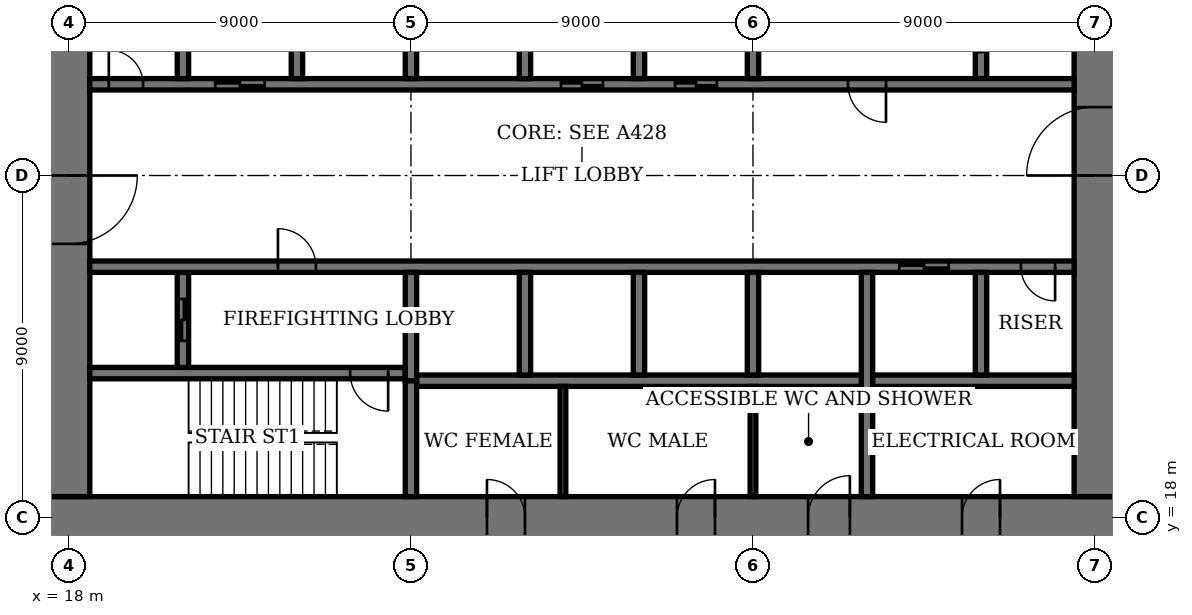
"""IFC4 building model, lengths in metres.
Left out: names, types, materials, properties, quantities, classifications, styles, units other than length and angle.
Written with IfcOpenShell. Run it as: python <this file> out.ifc"""

import sys

from ifc_helpers import new_model, si_unit, direction, frame, frame_2d, origin, place, context, subcontext, project, spatial, rectangle, extrude, element, fill, save


model = new_model("IFC4")
c1 = context("Model", 3, precision=1e-05, world=origin(), true_north=direction((0.0, 1.0)))
c2 = subcontext(c1, "Body", "Model", "MODEL_VIEW")
j1 = project(units=[si_unit("LENGTHUNIT", "METRE"), si_unit("PLANEANGLEUNIT", "RADIAN")], contexts=[c1])
p1 = place(None, origin())
s1 = spatial("IfcSite", under=j1, at=p1, CompositionType="ELEMENT")
p2 = place(p1, origin())
s2 = spatial("IfcBuilding", under=s1, at=p2, CompositionType="ELEMENT")
p3 = place(p2, frame((0.0, 0.0, 137.0)))
s3 = spatial("IfcBuildingStorey", under=s2, at=p3, CompositionType="ELEMENT", Elevation=137.0)
p4 = place(p3, frame((17.45, 18.0, 0.0), z_axis=(0.0, 0.0, 1.0), x_axis=(1.0, 0.0, 0.0)))
e1 = element("IfcWall", 1, at=p4, inside=s3, PredefinedType="SHEAR", context=c2, shape_type="SweptSolid", body=[
    extrude(rectangle(XDim=28.1, YDim=1.1, at=frame_2d((14.05, 0.0))), origin(), (0.0, 0.0, 1.0), 4.0),
])
p5 = place(p4, frame((11.55, 0.0, 0.0)))
e2 = element("IfcOpeningElement", 2, at=p5, cuts=e1, PredefinedType="OPENING", context=c2, shape_type="SweptSolid", body=[
    extrude(rectangle(XDim=1.0, YDim=2.4, at=frame_2d((0.5, 1.2))), frame((0.0, 0.56, 0.0), z_axis=(0.0, -1.0, 0.0), x_axis=(1.0, 0.0, 0.0)), (0.0, 0.0, 1.0), 1.12),
])
p6 = place(p4, frame((16.55, 0.0, 0.0)))
e3 = element("IfcOpeningElement", 3, at=p6, cuts=e1, PredefinedType="OPENING", context=c2, shape_type="SweptSolid", body=[
    extrude(rectangle(XDim=1.0, YDim=2.4, at=frame_2d((0.5, 1.2))), frame((0.0, 0.56, 0.0), z_axis=(0.0, -1.0, 0.0), x_axis=(1.0, 0.0, 0.0)), (0.0, 0.0, 1.0), 1.12),
])
p7 = place(p4, frame((20.0, 0.0, 0.0)))
e4 = element("IfcOpeningElement", 4, at=p7, cuts=e1, PredefinedType="OPENING", context=c2, shape_type="SweptSolid", body=[
    extrude(rectangle(XDim=1.1, YDim=2.4, at=frame_2d((0.55, 1.2))), frame((0.0, 0.56, 0.0), z_axis=(0.0, -1.0, 0.0), x_axis=(1.0, 0.0, 0.0)), (0.0, 0.0, 1.0), 1.12),
])
p8 = place(p4, frame((24.05, 0.0, 0.0)))
e5 = element("IfcOpeningElement", 5, at=p8, cuts=e1, PredefinedType="OPENING", context=c2, shape_type="SweptSolid", body=[
    extrude(rectangle(XDim=1.0, YDim=2.4, at=frame_2d((0.5, 1.2))), frame((0.0, 0.56, 0.0), z_axis=(0.0, -1.0, 0.0), x_axis=(1.0, 0.0, 0.0)), (0.0, 0.0, 1.0), 1.12),
])
p9 = place(p3, frame((18.0, 35.45, 0.0), z_axis=(0.0, 0.0, 1.0), x_axis=(0.0, -1.0, 0.0)))
e6 = element("IfcWall", 6, at=p9, inside=s3, PredefinedType="SHEAR", context=c2, shape_type="SweptSolid", body=[
    extrude(rectangle(XDim=16.9, YDim=1.1, at=frame_2d((8.45, 0.0))), origin(), (0.0, 0.0, 1.0), 4.0),
])
p10 = place(p9, frame((8.45, 0.0, 0.0)))
e7 = element("IfcOpeningElement", 7, at=p10, cuts=e6, PredefinedType="OPENING", context=c2, shape_type="SweptSolid", body=[
    extrude(rectangle(XDim=1.8, YDim=2.4, at=frame_2d((0.9, 1.2))), frame((0.0, 0.56, 0.0), z_axis=(0.0, -1.0, 0.0), x_axis=(1.0, 0.0, 0.0)), (0.0, 0.0, 1.0), 1.12),
])
p11 = place(p3, frame((45.0, 18.55, 0.0), z_axis=(0.0, 0.0, 1.0), x_axis=(0.0, 1.0, 0.0)))
e8 = element("IfcWall", 8, at=p11, inside=s3, PredefinedType="SHEAR", context=c2, shape_type="SweptSolid", body=[
    extrude(rectangle(XDim=16.9, YDim=1.1, at=frame_2d((8.45, 0.0))), origin(), (0.0, 0.0, 1.0), 4.0),
])
p12 = place(p11, frame((8.45, 0.0, 0.0)))
e9 = element("IfcOpeningElement", 9, at=p12, cuts=e8, PredefinedType="OPENING", context=c2, shape_type="SweptSolid", body=[
    extrude(rectangle(XDim=1.8, YDim=2.4, at=frame_2d((0.9, 1.2))), frame((0.0, 0.56, 0.0), z_axis=(0.0, -1.0, 0.0), x_axis=(1.0, 0.0, 0.0)), (0.0, 0.0, 1.0), 1.12),
])
p13 = place(p3, frame((18.55, 21.8, 0.0), z_axis=(0.0, 0.0, 1.0), x_axis=(1.0, 0.0, 0.0)))
e10 = element("IfcWall", 10, at=p13, inside=s3, PredefinedType="SHEAR", context=c2, shape_type="SweptSolid", body=[
    extrude(rectangle(XDim=8.3, YDim=0.3, at=frame_2d((4.15, 0.0))), origin(), (0.0, 0.0, 1.0), 4.0),
])
p14 = place(p13, frame((6.85, 0.0, 0.0)))
e11 = element("IfcOpeningElement", 11, at=p14, cuts=e10, PredefinedType="OPENING", context=c2, shape_type="SweptSolid", body=[
    extrude(rectangle(XDim=1.0, YDim=2.4, at=frame_2d((0.5, 1.2))), frame((0.0, 0.16, 0.0), z_axis=(0.0, -1.0, 0.0), x_axis=(1.0, 0.0, 0.0)), (0.0, 0.0, 1.0), 0.32),
])
p15 = place(p3, frame((27.0, 18.55, 0.0), z_axis=(0.0, 0.0, 1.0), x_axis=(0.0, 1.0, 0.0)))
e12 = element("IfcWall", 12, at=p15, inside=s3, PredefinedType="SHEAR", context=c2, shape_type="SweptSolid", body=[
    extrude(rectangle(XDim=3.05, YDim=0.3, at=frame_2d((1.525, 0.0))), origin(), (0.0, 0.0, 1.0), 4.0),
])
p16 = place(p3, frame((21.0, 21.95, 0.0), z_axis=(0.0, 0.0, 1.0), x_axis=(0.0, 1.0, 0.0)))
e13 = element("IfcWall", 13, at=p16, inside=s3, PredefinedType="SHEAR", context=c2, shape_type="SweptSolid", body=[
    extrude(rectangle(XDim=2.5, YDim=0.3, at=frame_2d((1.25, 0.0))), origin(), (0.0, 0.0, 1.0), 4.0),
])
p17 = place(p16, frame((0.7, 0.0, 0.0)))
e14 = element("IfcOpeningElement", 14, at=p17, cuts=e13, PredefinedType="OPENING", context=c2, shape_type="SweptSolid", body=[
    extrude(rectangle(XDim=1.1, YDim=2.4, at=frame_2d((0.55, 1.2))), frame((0.0, 0.16, 0.0), z_axis=(0.0, -1.0, 0.0), x_axis=(1.0, 0.0, 0.0)), (0.0, 0.0, 1.0), 0.32),
])
p18 = place(p3, frame((42.0, 29.55, 0.0), z_axis=(0.0, 0.0, 1.0), x_axis=(0.0, 1.0, 0.0)))
e15 = element("IfcWall", 15, at=p18, inside=s3, PredefinedType="SHEAR", context=c2, shape_type="SweptSolid", body=[
    extrude(rectangle(XDim=2.5, YDim=0.3, at=frame_2d((1.25, 0.0))), origin(), (0.0, 0.0, 1.0), 4.0),
])
p19 = place(p18, frame((0.7, 0.0, 0.0)))
e16 = element("IfcOpeningElement", 16, at=p19, cuts=e15, PredefinedType="OPENING", context=c2, shape_type="SweptSolid", body=[
    extrude(rectangle(XDim=1.1, YDim=2.4, at=frame_2d((0.55, 1.2))), frame((0.0, 0.16, 0.0), z_axis=(0.0, -1.0, 0.0), x_axis=(1.0, 0.0, 0.0)), (0.0, 0.0, 1.0), 0.32),
])
p20 = place(p3, frame((18.55, 24.6, 0.0), z_axis=(0.0, 0.0, 1.0), x_axis=(1.0, 0.0, 0.0)))
e17 = element("IfcWall", 17, at=p20, inside=s3, PredefinedType="SHEAR", context=c2, shape_type="SweptSolid", body=[
    extrude(rectangle(XDim=25.9, YDim=0.3, at=frame_2d((12.95, 0.0))), origin(), (0.0, 0.0, 1.0), 4.0),
])
p21 = place(p20, frame((4.95, 0.0, 0.0)))
e18 = element("IfcOpeningElement", 18, at=p21, cuts=e17, PredefinedType="OPENING", context=c2, shape_type="SweptSolid", body=[
    extrude(rectangle(XDim=1.0, YDim=2.4, at=frame_2d((0.5, 1.2))), frame((0.0, 0.16, 0.0), z_axis=(0.0, -1.0, 0.0), x_axis=(1.0, 0.0, 0.0)), (0.0, 0.0, 1.0), 0.32),
])
p22 = place(p20, frame((24.5, 0.0, 0.0)))
e19 = element("IfcOpeningElement", 19, at=p22, cuts=e17, PredefinedType="OPENING", context=c2, shape_type="SweptSolid", body=[
    extrude(rectangle(XDim=0.9, YDim=2.1, at=frame_2d((0.45, 1.05))), frame((0.0, 0.16, 0.0), z_axis=(0.0, -1.0, 0.0), x_axis=(1.0, 0.0, 0.0)), (0.0, 0.0, 1.0), 0.32),
])
p23 = place(p20, frame((21.3, 0.0, 0.0)))
e20 = element("IfcOpeningElement", 20, at=p23, cuts=e17, PredefinedType="OPENING", context=c2, shape_type="SweptSolid", body=[
    extrude(rectangle(XDim=1.3, YDim=2.4, at=frame_2d((0.65, 1.2))), frame((0.0, 0.16, 0.0), z_axis=(0.0, -1.0, 0.0), x_axis=(1.0, 0.0, 0.0)), (0.0, 0.0, 1.0), 0.32),
])
p24 = place(p3, frame((18.55, 29.4, 0.0), z_axis=(0.0, 0.0, 1.0), x_axis=(1.0, 0.0, 0.0)))
e21 = element("IfcWall", 21, at=p24, inside=s3, PredefinedType="SHEAR", context=c2, shape_type="SweptSolid", body=[
    extrude(rectangle(XDim=25.9, YDim=0.3, at=frame_2d((12.95, 0.0))), origin(), (0.0, 0.0, 1.0), 4.0),
])
p25 = place(p24, frame((19.95, 0.0, 0.0)))
e22 = element("IfcOpeningElement", 22, at=p25, cuts=e21, PredefinedType="OPENING", context=c2, shape_type="SweptSolid", body=[
    extrude(rectangle(XDim=1.0, YDim=2.4, at=frame_2d((0.5, 1.2))), frame((0.0, 0.16, 0.0), z_axis=(0.0, -1.0, 0.0), x_axis=(1.0, 0.0, 0.0)), (0.0, 0.0, 1.0), 0.32),
])
p26 = place(p24, frame((0.5, 0.0, 0.0)))
e23 = element("IfcOpeningElement", 23, at=p26, cuts=e21, PredefinedType="OPENING", context=c2, shape_type="SweptSolid", body=[
    extrude(rectangle(XDim=0.9, YDim=2.1, at=frame_2d((0.45, 1.05))), frame((0.0, 0.16, 0.0), z_axis=(0.0, -1.0, 0.0), x_axis=(1.0, 0.0, 0.0)), (0.0, 0.0, 1.0), 0.32),
])
p27 = place(p24, frame((15.4, 0.0, 0.0)))
e24 = element("IfcOpeningElement", 24, at=p27, cuts=e21, PredefinedType="OPENING", context=c2, shape_type="SweptSolid", body=[
    extrude(rectangle(XDim=1.1, YDim=2.4, at=frame_2d((0.55, 1.2))), frame((0.0, 0.16, 0.0), z_axis=(0.0, -1.0, 0.0), x_axis=(1.0, 0.0, 0.0)), (0.0, 0.0, 1.0), 0.32),
])
p28 = place(p24, frame((12.4, 0.0, 0.0)))
e25 = element("IfcOpeningElement", 25, at=p28, cuts=e21, PredefinedType="OPENING", context=c2, shape_type="SweptSolid", body=[
    extrude(rectangle(XDim=1.1, YDim=2.4, at=frame_2d((0.55, 1.2))), frame((0.0, 0.16, 0.0), z_axis=(0.0, -1.0, 0.0), x_axis=(1.0, 0.0, 0.0)), (0.0, 0.0, 1.0), 0.32),
])
p29 = place(p24, frame((3.3, 0.0, 0.0)))
e26 = element("IfcOpeningElement", 26, at=p29, cuts=e21, PredefinedType="OPENING", context=c2, shape_type="SweptSolid", body=[
    extrude(rectangle(XDim=1.3, YDim=2.4, at=frame_2d((0.65, 1.2))), frame((0.0, 0.16, 0.0), z_axis=(0.0, -1.0, 0.0), x_axis=(1.0, 0.0, 0.0)), (0.0, 0.0, 1.0), 0.32),
])
p30 = place(p3, frame((27.15, 21.6, 0.0), z_axis=(0.0, 0.0, 1.0), x_axis=(1.0, 0.0, 0.0)))
e27 = element("IfcWall", 27, at=p30, inside=s3, PredefinedType="SHEAR", context=c2, shape_type="SweptSolid", body=[
    extrude(rectangle(XDim=17.3, YDim=0.3, at=frame_2d((8.65, 0.0))), origin(), (0.0, 0.0, 1.0), 4.0),
])
for number, where, z_axis, x_axis in (
    (28, (30.0, 21.75, 0.0), (0.0, 0.0, 1.0), (0.0, 1.0, 0.0)),
    (29, (33.0, 29.55, 0.0), (0.0, 0.0, 1.0), (0.0, 1.0, 0.0)),
    (30, (33.0, 21.75, 0.0), (0.0, 0.0, 1.0), (0.0, 1.0, 0.0)),
    (31, (30.0, 29.55, 0.0), (0.0, 0.0, 1.0), (0.0, 1.0, 0.0)),
    (32, (36.0, 21.75, 0.0), (0.0, 0.0, 1.0), (0.0, 1.0, 0.0)),
    (33, (27.0, 29.55, 0.0), (0.0, 0.0, 1.0), (0.0, 1.0, 0.0)),
):
    element("IfcWall", number, at=place(p3, frame(where, z_axis=z_axis, x_axis=x_axis)), inside=s3, PredefinedType="SHEAR", context=c2, shape_type="SweptSolid", body=[
        extrude(rectangle(XDim=2.7, YDim=0.3, at=frame_2d((1.35, 0.0))), origin(), (0.0, 0.0, 1.0), 4.0),
    ])
for number, where, z_axis, x_axis in (
    (34, (39.0, 18.55, 0.0), (0.0, 0.0, 1.0), (0.0, 1.0, 0.0)),
    (35, (24.0, 29.55, 0.0), (0.0, 0.0, 1.0), (0.0, 1.0, 0.0)),
):
    element("IfcWall", number, at=place(p3, frame(where, z_axis=z_axis, x_axis=x_axis)), inside=s3, PredefinedType="SHEAR", context=c2, shape_type="SweptSolid", body=[
        extrude(rectangle(XDim=5.9, YDim=0.3, at=frame_2d((2.95, 0.0))), origin(), (0.0, 0.0, 1.0), 4.0),
    ])
for number, where, z_axis, x_axis in (
    (36, (42.0, 21.75, 0.0), (0.0, 0.0, 1.0), (0.0, 1.0, 0.0)),
    (37, (21.0, 29.55, 0.0), (0.0, 0.0, 1.0), (0.0, 1.0, 0.0)),
):
    element("IfcWall", number, at=place(p3, frame(where, z_axis=z_axis, x_axis=x_axis)), inside=s3, PredefinedType="SHEAR", context=c2, shape_type="SweptSolid", body=[
        extrude(rectangle(XDim=2.7, YDim=0.3, at=frame_2d((1.35, 0.0))), origin(), (0.0, 0.0, 1.0), 4.0),
    ])
for number, where, z_axis, x_axis in (
    (38, (27.0, 21.6, 0.0), (0.0, 0.0, 1.0), (0.0, 1.0, 0.0)),
    (39, (36.0, 29.55, 0.0), (0.0, 0.0, 1.0), (0.0, 1.0, 0.0)),
):
    element("IfcWall", number, at=place(p3, frame(where, z_axis=z_axis, x_axis=x_axis)), inside=s3, PredefinedType="SHEAR", context=c2, shape_type="SweptSolid", body=[
        extrude(rectangle(XDim=2.85, YDim=0.3, at=frame_2d((1.425, 0.0))), origin(), (0.0, 0.0, 1.0), 4.0),
    ])
for number, where, z_axis, x_axis in (
    (40, (31.0, 18.55, 0.0), (0.0, 0.0, 1.0), (0.0, 1.0, 0.0)),
    (41, (36.0, 18.55, 0.0), (0.0, 0.0, 1.0), (0.0, 1.0, 0.0)),
):
    element("IfcWall", number, at=place(p3, frame(where, z_axis=z_axis, x_axis=x_axis)), inside=s3, PredefinedType="PARTITIONING", context=c2, shape_type="SweptSolid", body=[
        extrude(rectangle(XDim=2.9, YDim=0.15, at=frame_2d((1.45, 0.0))), origin(), (0.0, 0.0, 1.0), 3.75),
    ])
p31 = place(p10, origin())
e42 = element("IfcDoor", 42, at=p31, inside=s3, OperationType="DOUBLE_DOOR_DOUBLE_SWING", PredefinedType="DOOR", context=c2, shape_type="SweptSolid", body=[
    extrude(rectangle(XDim=1.8, YDim=2.4, at=frame_2d((0.9, 1.2))), frame((0.0, 0.03, 0.0), z_axis=(0.0, -1.0, 0.0), x_axis=(1.0, 0.0, 0.0)), (0.0, 0.0, 1.0), 0.06),
    extrude(rectangle(XDim=0.04, YDim=2.4, at=frame_2d((0.02, 1.2))), frame((0.0, 0.55, 0.0), z_axis=(0.0, -1.0, 0.0), x_axis=(1.0, 0.0, 0.0)), (0.0, 0.0, 1.0), 1.1),
    extrude(rectangle(XDim=0.04, YDim=2.4, at=frame_2d((1.78, 1.2))), frame((0.0, 0.55, 0.0), z_axis=(0.0, -1.0, 0.0), x_axis=(1.0, 0.0, 0.0)), (0.0, 0.0, 1.0), 1.1),
    extrude(rectangle(XDim=1.8, YDim=0.04, at=frame_2d((0.9, 2.38))), frame((0.0, 0.55, 0.0), z_axis=(0.0, -1.0, 0.0), x_axis=(1.0, 0.0, 0.0)), (0.0, 0.0, 1.0), 1.1),
])
fill(e7, e42)
p32 = place(p12, origin())
e43 = element("IfcDoor", 43, at=p32, inside=s3, OperationType="DOUBLE_DOOR_DOUBLE_SWING", PredefinedType="DOOR", context=c2, shape_type="SweptSolid", body=[
    extrude(rectangle(XDim=1.8, YDim=2.4, at=frame_2d((0.9, 1.2))), frame((0.0, 0.03, 0.0), z_axis=(0.0, -1.0, 0.0), x_axis=(1.0, 0.0, 0.0)), (0.0, 0.0, 1.0), 0.06),
    extrude(rectangle(XDim=0.04, YDim=2.4, at=frame_2d((0.02, 1.2))), frame((0.0, 0.55, 0.0), z_axis=(0.0, -1.0, 0.0), x_axis=(1.0, 0.0, 0.0)), (0.0, 0.0, 1.0), 1.1),
    extrude(rectangle(XDim=0.04, YDim=2.4, at=frame_2d((1.78, 1.2))), frame((0.0, 0.55, 0.0), z_axis=(0.0, -1.0, 0.0), x_axis=(1.0, 0.0, 0.0)), (0.0, 0.0, 1.0), 1.1),
    extrude(rectangle(XDim=1.8, YDim=0.04, at=frame_2d((0.9, 2.38))), frame((0.0, 0.55, 0.0), z_axis=(0.0, -1.0, 0.0), x_axis=(1.0, 0.0, 0.0)), (0.0, 0.0, 1.0), 1.1),
])
fill(e9, e43)
p33 = place(p5, origin())
e44 = element("IfcDoor", 44, at=p33, inside=s3, OperationType="SINGLE_SWING_RIGHT", PredefinedType="DOOR", context=c2, shape_type="SweptSolid", body=[
    extrude(rectangle(XDim=1.0, YDim=2.4, at=frame_2d((0.5, 1.2))), frame((0.0, 0.025, 0.0), z_axis=(0.0, -1.0, 0.0), x_axis=(1.0, 0.0, 0.0)), (0.0, 0.0, 1.0), 0.05),
    extrude(rectangle(XDim=0.04, YDim=2.4, at=frame_2d((0.02, 1.2))), frame((0.0, 0.4, 0.0), z_axis=(0.0, -1.0, 0.0), x_axis=(1.0, 0.0, 0.0)), (0.0, 0.0, 1.0), 0.8),
    extrude(rectangle(XDim=0.04, YDim=2.4, at=frame_2d((0.98, 1.2))), frame((0.0, 0.4, 0.0), z_axis=(0.0, -1.0, 0.0), x_axis=(1.0, 0.0, 0.0)), (0.0, 0.0, 1.0), 0.8),
    extrude(rectangle(XDim=1.0, YDim=0.04, at=frame_2d((0.5, 2.38))), frame((0.0, 0.4, 0.0), z_axis=(0.0, -1.0, 0.0), x_axis=(1.0, 0.0, 0.0)), (0.0, 0.0, 1.0), 0.8),
])
fill(e2, e44)
p34 = place(p6, origin())
e45 = element("IfcDoor", 45, at=p34, inside=s3, OperationType="SINGLE_SWING_LEFT", PredefinedType="DOOR", context=c2, shape_type="SweptSolid", body=[
    extrude(rectangle(XDim=1.0, YDim=2.4, at=frame_2d((0.5, 1.2))), frame((0.0, 0.025, 0.0), z_axis=(0.0, -1.0, 0.0), x_axis=(1.0, 0.0, 0.0)), (0.0, 0.0, 1.0), 0.05),
    extrude(rectangle(XDim=0.04, YDim=2.4, at=frame_2d((0.02, 1.2))), frame((0.0, 0.4, 0.0), z_axis=(0.0, -1.0, 0.0), x_axis=(1.0, 0.0, 0.0)), (0.0, 0.0, 1.0), 0.8),
    extrude(rectangle(XDim=0.04, YDim=2.4, at=frame_2d((0.98, 1.2))), frame((0.0, 0.4, 0.0), z_axis=(0.0, -1.0, 0.0), x_axis=(1.0, 0.0, 0.0)), (0.0, 0.0, 1.0), 0.8),
    extrude(rectangle(XDim=1.0, YDim=0.04, at=frame_2d((0.5, 2.38))), frame((0.0, 0.4, 0.0), z_axis=(0.0, -1.0, 0.0), x_axis=(1.0, 0.0, 0.0)), (0.0, 0.0, 1.0), 0.8),
])
fill(e3, e45)
p35 = place(p7, origin())
e46 = element("IfcDoor", 46, at=p35, inside=s3, OperationType="SINGLE_SWING_LEFT", PredefinedType="DOOR", context=c2, shape_type="SweptSolid", body=[
    extrude(rectangle(XDim=1.1, YDim=2.4, at=frame_2d((0.55, 1.2))), frame((0.0, 0.025, 0.0), z_axis=(0.0, -1.0, 0.0), x_axis=(1.0, 0.0, 0.0)), (0.0, 0.0, 1.0), 0.05),
    extrude(rectangle(XDim=0.04, YDim=2.4, at=frame_2d((0.02, 1.2))), frame((0.0, 0.44, 0.0), z_axis=(0.0, -1.0, 0.0), x_axis=(1.0, 0.0, 0.0)), (0.0, 0.0, 1.0), 0.88),
    extrude(rectangle(XDim=0.04, YDim=2.4, at=frame_2d((1.08, 1.2))), frame((0.0, 0.44, 0.0), z_axis=(0.0, -1.0, 0.0), x_axis=(1.0, 0.0, 0.0)), (0.0, 0.0, 1.0), 0.88),
    extrude(rectangle(XDim=1.1, YDim=0.04, at=frame_2d((0.55, 2.38))), frame((0.0, 0.44, 0.0), z_axis=(0.0, -1.0, 0.0), x_axis=(1.0, 0.0, 0.0)), (0.0, 0.0, 1.0), 0.88),
])
fill(e4, e46)
p36 = place(p8, origin())
e47 = element("IfcDoor", 47, at=p36, inside=s3, OperationType="SINGLE_SWING_LEFT", PredefinedType="DOOR", context=c2, shape_type="SweptSolid", body=[
    extrude(rectangle(XDim=1.0, YDim=2.4, at=frame_2d((0.5, 1.2))), frame((0.0, 0.025, 0.0), z_axis=(0.0, -1.0, 0.0), x_axis=(1.0, 0.0, 0.0)), (0.0, 0.0, 1.0), 0.05),
    extrude(rectangle(XDim=0.04, YDim=2.4, at=frame_2d((0.02, 1.2))), frame((0.0, 0.4, 0.0), z_axis=(0.0, -1.0, 0.0), x_axis=(1.0, 0.0, 0.0)), (0.0, 0.0, 1.0), 0.8),
    extrude(rectangle(XDim=0.04, YDim=2.4, at=frame_2d((0.98, 1.2))), frame((0.0, 0.4, 0.0), z_axis=(0.0, -1.0, 0.0), x_axis=(1.0, 0.0, 0.0)), (0.0, 0.0, 1.0), 0.8),
    extrude(rectangle(XDim=1.0, YDim=0.04, at=frame_2d((0.5, 2.38))), frame((0.0, 0.4, 0.0), z_axis=(0.0, -1.0, 0.0), x_axis=(1.0, 0.0, 0.0)), (0.0, 0.0, 1.0), 0.8),
])
fill(e5, e47)
p37 = place(p14, origin())
e48 = element("IfcDoor", 48, at=p37, inside=s3, OperationType="SINGLE_SWING_RIGHT", PredefinedType="DOOR", context=c2, shape_type="SweptSolid", body=[
    extrude(rectangle(XDim=1.0, YDim=2.4, at=frame_2d((0.5, 1.2))), frame((0.0, 0.03, 0.0), z_axis=(0.0, -1.0, 0.0), x_axis=(1.0, 0.0, 0.0)), (0.0, 0.0, 1.0), 0.06),
])
fill(e11, e48)
p38 = place(p21, origin())
e49 = element("IfcDoor", 49, at=p38, inside=s3, OperationType="SINGLE_SWING_RIGHT", PredefinedType="DOOR", context=c2, shape_type="SweptSolid", body=[
    extrude(rectangle(XDim=1.0, YDim=2.4, at=frame_2d((0.5, 1.2))), frame((0.0, 0.03, 0.0), z_axis=(0.0, -1.0, 0.0), x_axis=(1.0, 0.0, 0.0)), (0.0, 0.0, 1.0), 0.06),
])
fill(e18, e49)
p39 = place(p25, origin())
e50 = element("IfcDoor", 50, at=p39, inside=s3, OperationType="SINGLE_SWING_RIGHT", PredefinedType="DOOR", context=c2, shape_type="SweptSolid", body=[
    extrude(rectangle(XDim=1.0, YDim=2.4, at=frame_2d((0.5, 1.2))), frame((0.0, 0.03, 0.0), z_axis=(0.0, -1.0, 0.0), x_axis=(1.0, 0.0, 0.0)), (0.0, 0.0, 1.0), 0.06),
])
fill(e22, e50)
p40 = place(p22, origin())
e51 = element("IfcDoor", 51, at=p40, inside=s3, OperationType="SINGLE_SWING_RIGHT", PredefinedType="DOOR", context=c2, shape_type="SweptSolid", body=[
    extrude(rectangle(XDim=0.9, YDim=2.1, at=frame_2d((0.45, 1.05))), frame((0.0, 0.03, 0.0), z_axis=(0.0, -1.0, 0.0), x_axis=(1.0, 0.0, 0.0)), (0.0, 0.0, 1.0), 0.06),
])
fill(e19, e51)
p41 = place(p26, origin())
e52 = element("IfcDoor", 52, at=p41, inside=s3, OperationType="SINGLE_SWING_RIGHT", PredefinedType="DOOR", context=c2, shape_type="SweptSolid", body=[
    extrude(rectangle(XDim=0.9, YDim=2.1, at=frame_2d((0.45, 1.05))), frame((0.0, 0.03, 0.0), z_axis=(0.0, -1.0, 0.0), x_axis=(1.0, 0.0, 0.0)), (0.0, 0.0, 1.0), 0.06),
])
fill(e23, e52)
p42 = place(p27, origin())
e53 = element("IfcDoor", 53, at=p42, inside=s3, OperationType="DOUBLE_DOOR_SLIDING", PredefinedType="DOOR", context=c2, shape_type="SweptSolid", body=[
    extrude(rectangle(XDim=1.1, YDim=2.4, at=frame_2d((0.55, 1.2))), frame((0.0, 0.02, 0.0), z_axis=(0.0, -1.0, 0.0), x_axis=(1.0, 0.0, 0.0)), (0.0, 0.0, 1.0), 0.04),
])
fill(e24, e53)
p43 = place(p28, origin())
e54 = element("IfcDoor", 54, at=p43, inside=s3, OperationType="DOUBLE_DOOR_SLIDING", PredefinedType="DOOR", context=c2, shape_type="SweptSolid", body=[
    extrude(rectangle(XDim=1.1, YDim=2.4, at=frame_2d((0.55, 1.2))), frame((0.0, 0.02, 0.0), z_axis=(0.0, -1.0, 0.0), x_axis=(1.0, 0.0, 0.0)), (0.0, 0.0, 1.0), 0.04),
])
fill(e25, e54)
p44 = place(p23, origin())
e55 = element("IfcDoor", 55, at=p44, inside=s3, OperationType="DOUBLE_DOOR_SLIDING", PredefinedType="DOOR", context=c2, shape_type="SweptSolid", body=[
    extrude(rectangle(XDim=1.3, YDim=2.4, at=frame_2d((0.65, 1.2))), frame((0.0, 0.02, 0.0), z_axis=(0.0, -1.0, 0.0), x_axis=(1.0, 0.0, 0.0)), (0.0, 0.0, 1.0), 0.04),
])
fill(e20, e55)
p45 = place(p29, origin())
e56 = element("IfcDoor", 56, at=p45, inside=s3, OperationType="DOUBLE_DOOR_SLIDING", PredefinedType="DOOR", context=c2, shape_type="SweptSolid", body=[
    extrude(rectangle(XDim=1.3, YDim=2.4, at=frame_2d((0.65, 1.2))), frame((0.0, 0.02, 0.0), z_axis=(0.0, -1.0, 0.0), x_axis=(1.0, 0.0, 0.0)), (0.0, 0.0, 1.0), 0.04),
])
fill(e26, e56)
p46 = place(p17, origin())
e57 = element("IfcDoor", 57, at=p46, inside=s3, OperationType="DOUBLE_DOOR_SLIDING", PredefinedType="DOOR", context=c2, shape_type="SweptSolid", body=[
    extrude(rectangle(XDim=1.1, YDim=2.4, at=frame_2d((0.55, 1.2))), frame((0.0, 0.03, 0.0), z_axis=(0.0, -1.0, 0.0), x_axis=(1.0, 0.0, 0.0)), (0.0, 0.0, 1.0), 0.06),
])
fill(e14, e57)
save(model, sys.argv[1])
